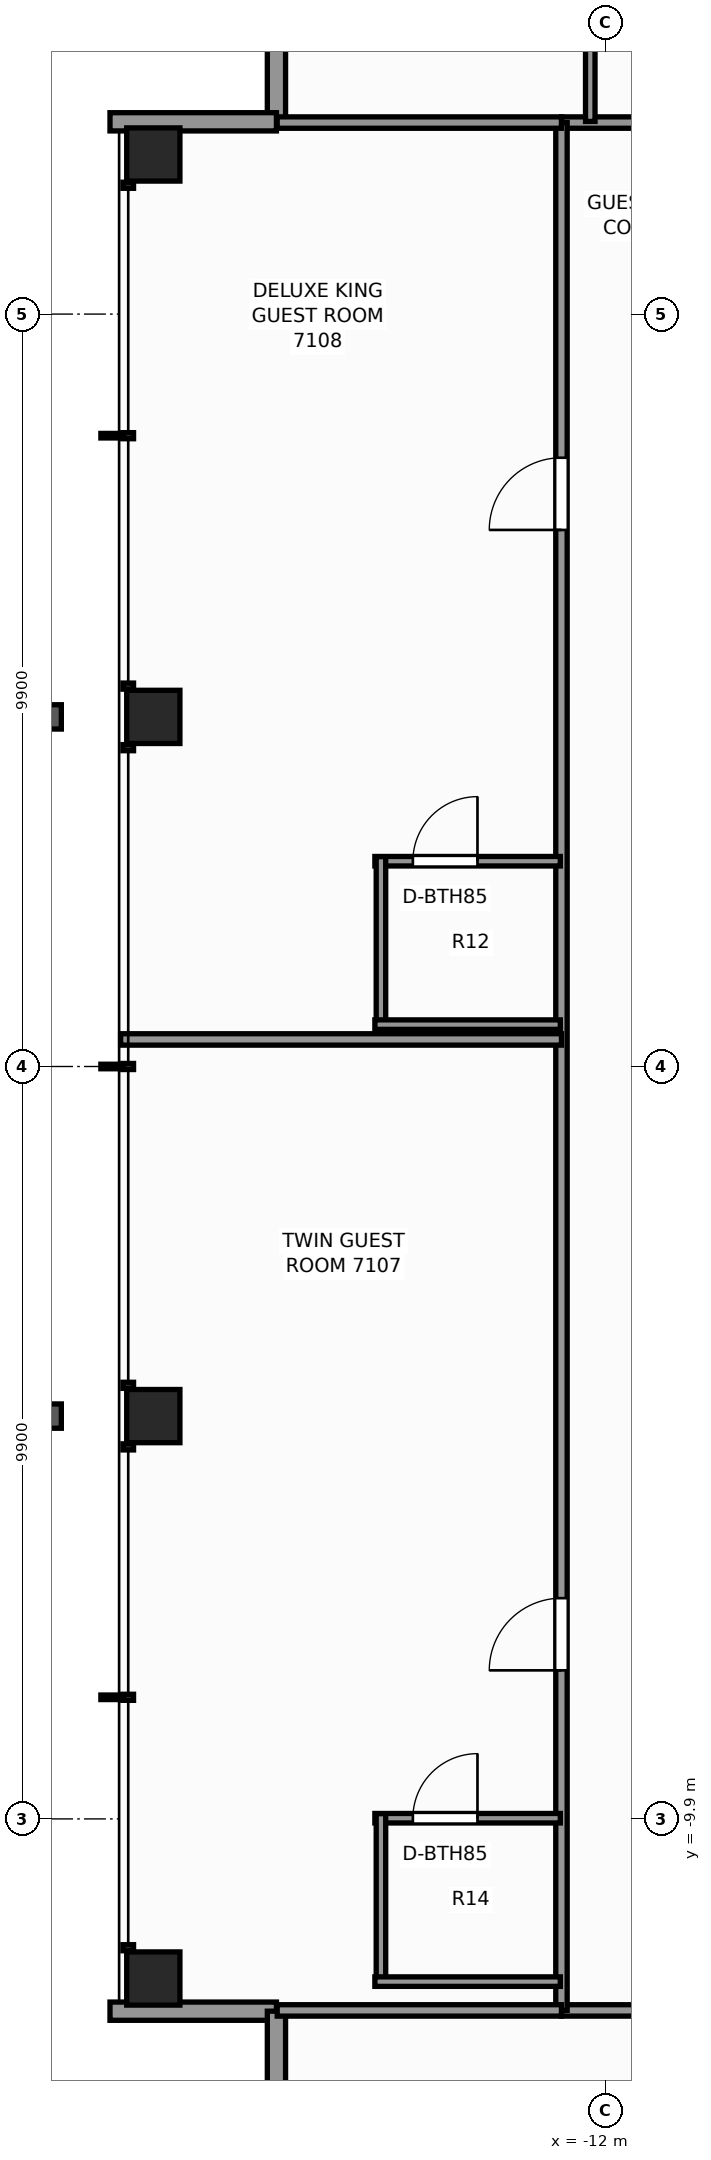
"""IFC4 building model, lengths in metres.
Left out: names, types, materials, properties, quantities, classifications, styles, units other than length and angle.
Written with IfcOpenShell. Run it as: python <this file> out.ifc"""

import sys

from ifc_helpers import new_model, si_unit, direction, frame, frame_2d, origin, origin_2d, place, context, subcontext, project, spatial, rectangle, extrude, element, fill, save


model = new_model("IFC4")
c1 = context("Model", 3, precision=1e-05, world=origin(), true_north=direction((0.0, 1.0)))
c2 = subcontext(c1, "Body", "Model", "MODEL_VIEW")
j1 = project(units=[si_unit("LENGTHUNIT", "METRE"), si_unit("PLANEANGLEUNIT", "RADIAN")], contexts=[c1])
p1 = place(None, origin())
s1 = spatial("IfcSite", under=j1, at=p1, CompositionType="ELEMENT")
p2 = place(p1, origin())
s2 = spatial("IfcBuilding", under=s1, at=p2, CompositionType="ELEMENT")
p3 = place(p2, frame((0.0, 0.0, 244.4)))
s3 = spatial("IfcBuildingStorey", under=s2, at=p3, CompositionType="ELEMENT", Elevation=244.4)
for number, where, z_axis, x_axis in (
    (1, (-17.95, -12.0, 0.0), (0.0, 0.0, 1.0), (1.0, 0.0, 0.0)),
    (2, (-17.95, -4.6, 0.0), (0.0, 0.0, 1.0), (1.0, 0.0, 0.0)),
    (3, (-17.95, 4.6, 0.0), (0.0, 0.0, 1.0), (1.0, 0.0, 0.0)),
    (4, (-17.95, 12.0, 0.0), (0.0, 0.0, 1.0), (1.0, 0.0, 0.0)),
):
    element("IfcColumn", number, at=place(p3, frame(where, z_axis=z_axis, x_axis=x_axis)), inside=s3, PredefinedType="COLUMN", context=c2, shape_type="SweptSolid", body=[
        extrude(rectangle(XDim=0.7, YDim=0.7, at=origin_2d()), origin(), (0.0, 0.0, 1.0), 3.5),
    ])
p4 = place(p3, frame((-16.33, 12.43, 0.0), z_axis=(0.0, 0.0, 1.0), x_axis=(0.0, 1.0, 0.0)))
e5 = element("IfcWall", 5, at=p4, inside=s3, PredefinedType="STANDARD", context=c2, shape_type="SweptSolid", body=[
    extrude(rectangle(XDim=2.19, YDim=0.24, at=frame_2d((1.095, 0.0))), origin(), (0.0, 0.0, 1.0), 2.633),
])
for number, where, z_axis, x_axis in (
    (6, (-18.52, 12.43, 0.0), (0.0, 0.0, 1.0), (1.0, 0.0, 0.0)),
    (7, (-16.33, -12.43, 0.0), (0.0, 0.0, 1.0), (-1.0, 0.0, 0.0)),
):
    element("IfcWall", number, at=place(p3, frame(where, z_axis=z_axis, x_axis=x_axis)), inside=s3, PredefinedType="STANDARD", context=c2, shape_type="SweptSolid", body=[
        extrude(rectangle(XDim=2.19, YDim=0.24, at=frame_2d((1.095, 0.0))), origin(), (0.0, 0.0, 1.0), 2.633),
    ])
p5 = place(p3, frame((-16.33, -14.62, 0.0), z_axis=(0.0, 0.0, 1.0), x_axis=(0.0, 1.0, 0.0)))
e8 = element("IfcWall", 8, at=p5, inside=s3, PredefinedType="STANDARD", context=c2, shape_type="SweptSolid", body=[
    extrude(rectangle(XDim=2.19, YDim=0.24, at=frame_2d((1.095, 0.0))), origin(), (0.0, 0.0, 1.0), 2.633),
])
p6 = place(p3, frame((-12.58, -12.42, 0.0), z_axis=(0.0, 0.0, 1.0), x_axis=(1.0, 0.0, 0.0)))
e9 = element("IfcWall", 9, at=p6, inside=s3, PredefinedType="PARTITIONING", context=c2, shape_type="SweptSolid", body=[
    extrude(rectangle(XDim=24.84, YDim=0.15, at=frame_2d((12.42, 0.0))), origin(), (0.0, 0.0, 1.0), 2.539),
])
p7 = place(p6, frame((4.595, 0.0, 0.0)))
e10 = element("IfcOpeningElement", 10, at=p7, cuts=e9, PredefinedType="OPENING", context=c2, shape_type="SweptSolid", body=[
    extrude(rectangle(XDim=0.9, YDim=2.06, at=frame_2d((0.45, 1.03))), frame((0.0, 0.085, 0.0), z_axis=(0.0, -1.0, 0.0), x_axis=(1.0, 0.0, 0.0)), (0.0, 0.0, 1.0), 0.17),
])
p8 = place(p6, frame((13.406, 0.0, 0.0)))
e11 = element("IfcOpeningElement", 11, at=p8, cuts=e9, PredefinedType="OPENING", context=c2, shape_type="SweptSolid", body=[
    extrude(rectangle(XDim=0.9, YDim=2.06, at=frame_2d((0.45, 1.03))), frame((0.0, 0.085, 0.0), z_axis=(0.0, -1.0, 0.0), x_axis=(1.0, 0.0, 0.0)), (0.0, 0.0, 1.0), 0.17),
])
p9 = place(p6, frame((18.028, 0.0, 0.0)))
e12 = element("IfcOpeningElement", 12, at=p9, cuts=e9, PredefinedType="OPENING", context=c2, shape_type="SweptSolid", body=[
    extrude(rectangle(XDim=0.95, YDim=2.06, at=frame_2d((0.475, 1.03))), frame((0.0, 0.085, 0.0), z_axis=(0.0, -1.0, 0.0), x_axis=(1.0, 0.0, 0.0)), (0.0, 0.0, 1.0), 0.17),
])
p10 = place(p6, frame((20.478, 0.0, 0.0)))
e13 = element("IfcOpeningElement", 13, at=p10, cuts=e9, PredefinedType="OPENING", context=c2, shape_type="SweptSolid", body=[
    extrude(rectangle(XDim=0.9, YDim=2.06, at=frame_2d((0.45, 1.03))), frame((0.0, 0.085, 0.0), z_axis=(0.0, -1.0, 0.0), x_axis=(1.0, 0.0, 0.0)), (0.0, 0.0, 1.0), 0.17),
])
p11 = place(p3, frame((-12.58, 12.42, 0.0), z_axis=(0.0, 0.0, 1.0), x_axis=(1.0, 0.0, 0.0)))
e14 = element("IfcWall", 14, at=p11, inside=s3, PredefinedType="PARTITIONING", context=c2, shape_type="SweptSolid", body=[
    extrude(rectangle(XDim=24.84, YDim=0.15, at=frame_2d((12.42, 0.0))), origin(), (0.0, 0.0, 1.0), 2.539),
])
p12 = place(p11, frame((3.079, 0.0, 0.0)))
e15 = element("IfcOpeningElement", 15, at=p12, cuts=e14, PredefinedType="OPENING", context=c2, shape_type="SweptSolid", body=[
    extrude(rectangle(XDim=0.95, YDim=2.06, at=frame_2d((0.475, 1.03))), frame((0.0, 0.085, 0.0), z_axis=(0.0, -1.0, 0.0), x_axis=(1.0, 0.0, 0.0)), (0.0, 0.0, 1.0), 0.17),
])
p13 = place(p11, frame((10.075, 0.0, 0.0)))
e16 = element("IfcOpeningElement", 16, at=p13, cuts=e14, PredefinedType="OPENING", context=c2, shape_type="SweptSolid", body=[
    extrude(rectangle(XDim=0.95, YDim=2.06, at=frame_2d((0.475, 1.03))), frame((0.0, 0.085, 0.0), z_axis=(0.0, -1.0, 0.0), x_axis=(1.0, 0.0, 0.0)), (0.0, 0.0, 1.0), 0.17),
])
p14 = place(p11, frame((19.64, 0.0, 0.0)))
e17 = element("IfcOpeningElement", 17, at=p14, cuts=e14, PredefinedType="OPENING", context=c2, shape_type="SweptSolid", body=[
    extrude(rectangle(XDim=0.95, YDim=2.06, at=frame_2d((0.475, 1.03))), frame((0.0, 0.085, 0.0), z_axis=(0.0, -1.0, 0.0), x_axis=(1.0, 0.0, 0.0)), (0.0, 0.0, 1.0), 0.17),
])
p15 = place(p3, frame((-12.58, -12.42, 0.0), z_axis=(0.0, 0.0, 1.0), x_axis=(0.0, 1.0, 0.0)))
e18 = element("IfcWall", 18, at=p15, inside=s3, PredefinedType="PARTITIONING", context=c2, shape_type="SweptSolid", body=[
    extrude(rectangle(XDim=24.84, YDim=0.15, at=frame_2d((12.42, 0.0))), origin(), (0.0, 0.0, 1.0), 2.539),
])
p16 = place(p15, frame((4.475, 0.0, 0.0)))
e19 = element("IfcOpeningElement", 19, at=p16, cuts=e18, PredefinedType="OPENING", context=c2, shape_type="SweptSolid", body=[
    extrude(rectangle(XDim=0.95, YDim=2.06, at=frame_2d((0.475, 1.03))), frame((0.0, 0.085, 0.0), z_axis=(0.0, -1.0, 0.0), x_axis=(1.0, 0.0, 0.0)), (0.0, 0.0, 1.0), 0.17),
])
p17 = place(p15, frame((19.48, 0.0, 0.0)))
e20 = element("IfcOpeningElement", 20, at=p17, cuts=e18, PredefinedType="OPENING", context=c2, shape_type="SweptSolid", body=[
    extrude(rectangle(XDim=0.95, YDim=2.06, at=frame_2d((0.475, 1.03))), frame((0.0, 0.085, 0.0), z_axis=(0.0, -1.0, 0.0), x_axis=(1.0, 0.0, 0.0)), (0.0, 0.0, 1.0), 0.17),
])
for number, where, z_axis, x_axis in (
    (21, (-16.32, -12.42, 0.0), (0.0, 0.0, 1.0), (1.0, 0.0, 0.0)),
    (22, (-16.32, 12.42, 0.0), (0.0, 0.0, 1.0), (1.0, 0.0, 0.0)),
):
    element("IfcWall", number, at=place(p3, frame(where, z_axis=z_axis, x_axis=x_axis)), inside=s3, PredefinedType="PARTITIONING", context=c2, shape_type="SweptSolid", body=[
        extrude(rectangle(XDim=3.74, YDim=0.15, at=frame_2d((1.87, 0.0))), origin(), (0.0, 0.0, 1.0), 3.25),
    ])
p18 = place(p3, frame((-18.38, 0.356, 0.0), z_axis=(0.0, 0.0, 1.0), x_axis=(1.0, 0.0, 0.0)))
e23 = element("IfcWall", 23, at=p18, inside=s3, PredefinedType="PARTITIONING", context=c2, shape_type="SweptSolid", body=[
    extrude(rectangle(XDim=5.8, YDim=0.15, at=frame_2d((2.9, 0.0))), origin(), (0.0, 0.0, 1.0), 2.623),
])
p19 = place(p3, frame((-15.035, -9.891, 0.0), z_axis=(0.0, 0.0, 1.0), x_axis=(1.0, 0.0, 0.0)))
e24 = element("IfcWall", 24, at=p19, inside=s3, PredefinedType="PARTITIONING", context=c2, shape_type="SweptSolid", body=[
    extrude(rectangle(XDim=2.44, YDim=0.125, at=frame_2d((1.22, 0.0))), origin(), (0.0, 0.0, 1.0), 3.25),
])
p20 = place(p19, frame((0.5, 0.0, 0.0)))
e25 = element("IfcOpeningElement", 25, at=p20, cuts=e24, PredefinedType="OPENING", context=c2, shape_type="SweptSolid", body=[
    extrude(rectangle(XDim=0.85, YDim=2.03, at=frame_2d((0.425, 1.015))), frame((0.0, 0.073, 0.0), z_axis=(0.0, -1.0, 0.0), x_axis=(1.0, 0.0, 0.0)), (0.0, 0.0, 1.0), 0.145),
])
p21 = place(p3, frame((-14.955, -12.101, 0.0), z_axis=(0.0, 0.0, 1.0), x_axis=(0.0, 1.0, 0.0)))
e26 = element("IfcWall", 26, at=p21, inside=s3, PredefinedType="PARTITIONING", context=c2, shape_type="SweptSolid", body=[
    extrude(rectangle(XDim=2.27, YDim=0.125, at=frame_2d((1.135, 0.0))), origin(), (0.0, 0.0, 1.0), 2.539),
])
p22 = place(p3, frame((-15.035, -12.041, 0.0), z_axis=(0.0, 0.0, 1.0), x_axis=(1.0, 0.0, 0.0)))
e27 = element("IfcWall", 27, at=p22, inside=s3, PredefinedType="PARTITIONING", context=c2, shape_type="SweptSolid", body=[
    extrude(rectangle(XDim=2.44, YDim=0.125, at=frame_2d((1.22, 0.0))), origin(), (0.0, 0.0, 1.0), 3.25),
])
p23 = place(p3, frame((-15.035, 2.701, 0.0), z_axis=(0.0, 0.0, 1.0), x_axis=(1.0, 0.0, 0.0)))
e28 = element("IfcWall", 28, at=p23, inside=s3, PredefinedType="PARTITIONING", context=c2, shape_type="SweptSolid", body=[
    extrude(rectangle(XDim=2.44, YDim=0.125, at=frame_2d((1.22, 0.0))), origin(), (0.0, 0.0, 1.0), 3.25),
])
p24 = place(p23, frame((0.5, 0.0, 0.0)))
e29 = element("IfcOpeningElement", 29, at=p24, cuts=e28, PredefinedType="OPENING", context=c2, shape_type="SweptSolid", body=[
    extrude(rectangle(XDim=0.85, YDim=2.03, at=frame_2d((0.425, 1.015))), frame((0.0, 0.073, 0.0), z_axis=(0.0, -1.0, 0.0), x_axis=(1.0, 0.0, 0.0)), (0.0, 0.0, 1.0), 0.145),
])
p25 = place(p3, frame((-14.955, 0.491, 0.0), z_axis=(0.0, 0.0, 1.0), x_axis=(0.0, 1.0, 0.0)))
e30 = element("IfcWall", 30, at=p25, inside=s3, PredefinedType="PARTITIONING", context=c2, shape_type="SweptSolid", body=[
    extrude(rectangle(XDim=2.27, YDim=0.125, at=frame_2d((1.135, 0.0))), origin(), (0.0, 0.0, 1.0), 3.25),
])
for number, where, z_axis, x_axis in (
    (31, (-15.035, 0.551, 0.0), (0.0, 0.0, 1.0), (1.0, 0.0, 0.0)),
    (32, (-12.201, 12.435, 0.0), (0.0, 0.0, 1.0), (0.0, 1.0, 0.0)),
):
    element("IfcWall", number, at=place(p3, frame(where, z_axis=z_axis, x_axis=x_axis)), inside=s3, PredefinedType="PARTITIONING", context=c2, shape_type="SweptSolid", body=[
        extrude(rectangle(XDim=2.44, YDim=0.125, at=frame_2d((1.22, 0.0))), origin(), (0.0, 0.0, 1.0), 3.25),
    ])
p26 = place(p20, origin())
e33 = element("IfcDoor", 33, at=p26, inside=s3, OperationType="SINGLE_SWING_RIGHT", PredefinedType="DOOR", context=c2, shape_type="SweptSolid", body=[
    extrude(rectangle(XDim=0.85, YDim=2.03, at=frame_2d((0.425, 1.015))), frame((0.0, 0.025, 0.0), z_axis=(0.0, -1.0, 0.0), x_axis=(1.0, 0.0, 0.0)), (0.0, 0.0, 1.0), 0.05),
])
fill(e25, e33)
p27 = place(p16, origin())
e34 = element("IfcDoor", 34, at=p27, inside=s3, OperationType="SINGLE_SWING_LEFT", PredefinedType="DOOR", context=c2, shape_type="SweptSolid", body=[
    extrude(rectangle(XDim=0.95, YDim=2.06, at=frame_2d((0.475, 1.03))), frame((0.0, 0.025, 0.0), z_axis=(0.0, -1.0, 0.0), x_axis=(1.0, 0.0, 0.0)), (0.0, 0.0, 1.0), 0.05),
])
fill(e19, e34)
p28 = place(p24, origin())
e35 = element("IfcDoor", 35, at=p28, inside=s3, OperationType="SINGLE_SWING_RIGHT", PredefinedType="DOOR", context=c2, shape_type="SweptSolid", body=[
    extrude(rectangle(XDim=0.85, YDim=2.03, at=frame_2d((0.425, 1.015))), frame((0.0, 0.025, 0.0), z_axis=(0.0, -1.0, 0.0), x_axis=(1.0, 0.0, 0.0)), (0.0, 0.0, 1.0), 0.05),
])
fill(e29, e35)
p29 = place(p17, origin())
e36 = element("IfcDoor", 36, at=p29, inside=s3, OperationType="SINGLE_SWING_LEFT", PredefinedType="DOOR", context=c2, shape_type="SweptSolid", body=[
    extrude(rectangle(XDim=0.95, YDim=2.06, at=frame_2d((0.475, 1.03))), frame((0.0, 0.025, 0.0), z_axis=(0.0, -1.0, 0.0), x_axis=(1.0, 0.0, 0.0)), (0.0, 0.0, 1.0), 0.05),
])
fill(e20, e36)
save(model, sys.argv[1])
